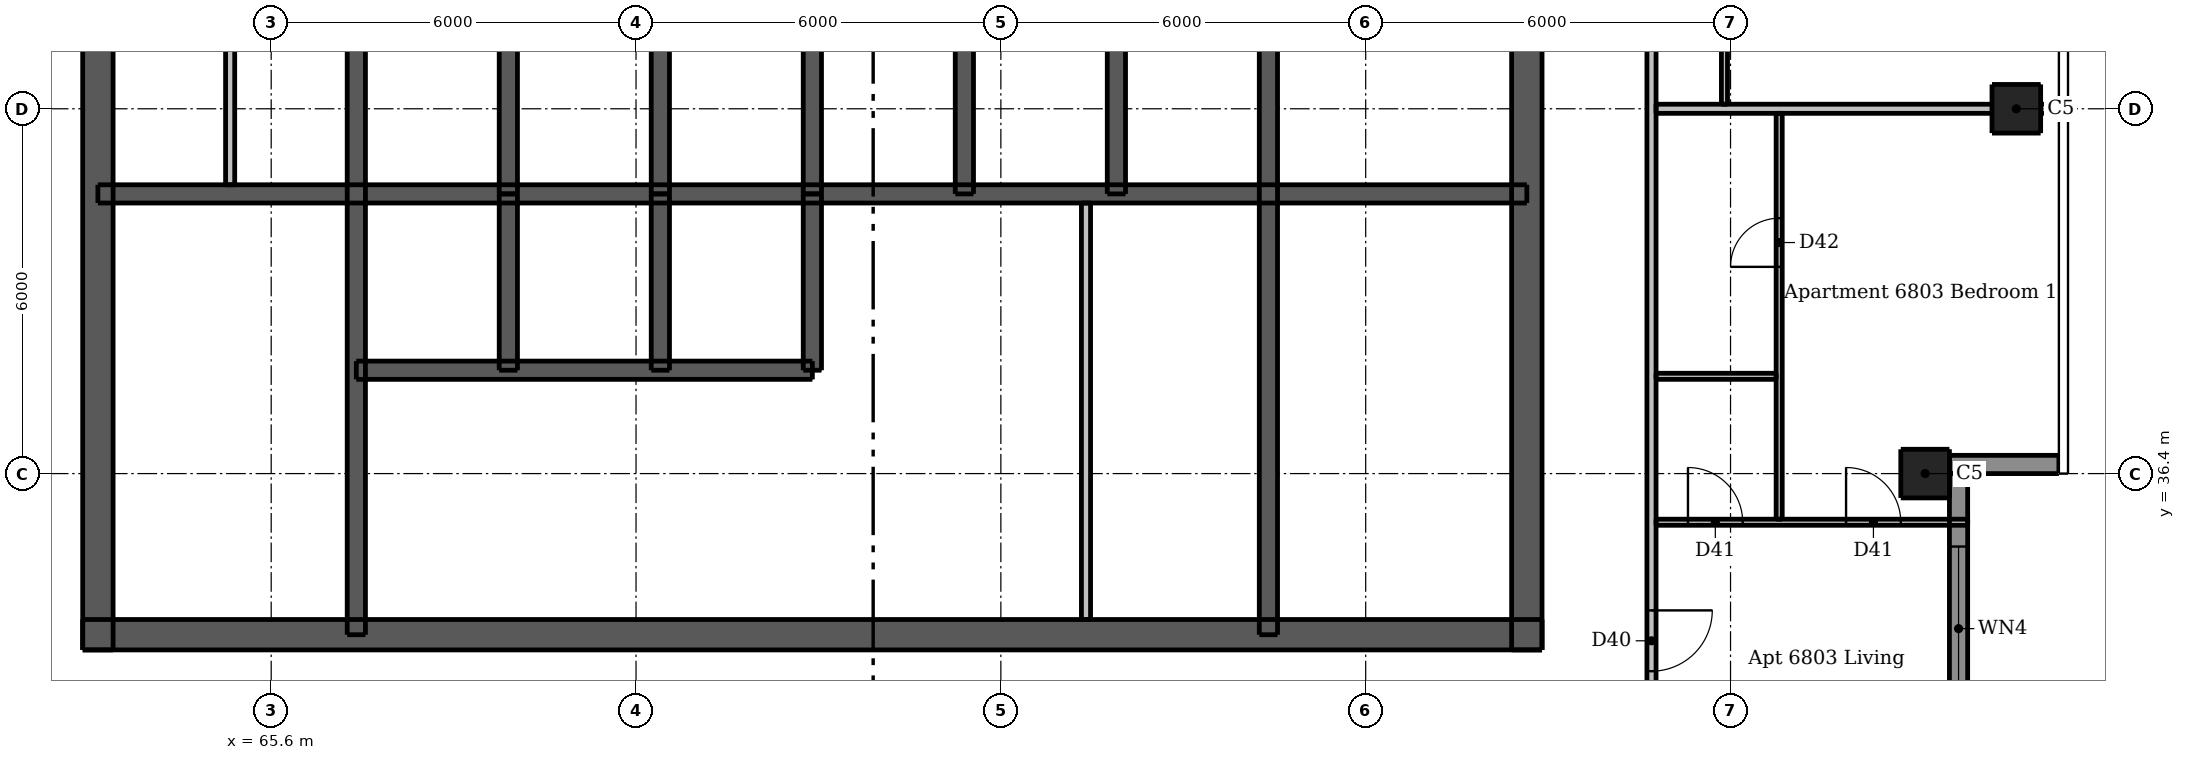
"""IFC4 building model, lengths in metres.
Left out: names, types, materials, properties, quantities, classifications, styles, units other than length and angle.
Written with IfcOpenShell. Run it as: python <this file> out.ifc"""

import sys

from ifc_helpers import new_model, si_unit, direction, frame, frame_2d, origin, origin_2d, place, context, subcontext, project, spatial, rectangle, extrude, element, fill, save


model = new_model("IFC4")
c1 = context("Model", 3, precision=1e-05, world=origin(), true_north=direction((0.0, 1.0)))
c2 = subcontext(c1, "Body", "Model", "MODEL_VIEW")
j1 = project(units=[si_unit("LENGTHUNIT", "METRE"), si_unit("PLANEANGLEUNIT", "RADIAN")], contexts=[c1])
p1 = place(None, origin())
s1 = spatial("IfcSite", under=j1, at=p1, CompositionType="ELEMENT")
p2 = place(p1, origin())
s2 = spatial("IfcBuilding", under=s1, at=p2, CompositionType="ELEMENT")
p3 = place(p2, frame((0.0, 0.0, 255.4)))
s3 = spatial("IfcBuildingStorey", under=s2, at=p3, CompositionType="ELEMENT", Elevation=255.4)
p4 = place(p3, frame((62.5, 33.75, 0.0), z_axis=(0.0, 0.0, 1.0), x_axis=(1.0, 0.0, 0.0)))
e1 = element("IfcWall", 1, at=p4, inside=s3, PredefinedType="SHEAR", context=c2, shape_type="SweptSolid", body=[
    extrude(rectangle(XDim=24.0, YDim=0.5, at=frame_2d((12.0, 0.0))), origin(), (0.0, 0.0, 1.0), 3.05),
])
p5 = place(p4, frame((1.875, 0.0, 0.0)))
e2 = element("IfcOpeningElement", 2, at=p5, cuts=e1, PredefinedType="OPENING", context=c2, shape_type="SweptSolid", body=[
    extrude(rectangle(XDim=1.1, YDim=2.1, at=frame_2d((0.55, 1.05))), frame((0.0, 0.26, 0.0), z_axis=(0.0, -1.0, 0.0), x_axis=(1.0, 0.0, 0.0)), (0.0, 0.0, 1.0), 0.52),
])
p6 = place(p4, frame((21.025, 0.0, 0.0)))
e3 = element("IfcOpeningElement", 3, at=p6, cuts=e1, PredefinedType="OPENING", context=c2, shape_type="SweptSolid", body=[
    extrude(rectangle(XDim=1.1, YDim=2.1, at=frame_2d((0.55, 1.05))), frame((0.0, 0.26, 0.0), z_axis=(0.0, -1.0, 0.0), x_axis=(1.0, 0.0, 0.0)), (0.0, 0.0, 1.0), 0.52),
])
p7 = place(p4, frame((8.0, 0.0, 0.0)))
e4 = element("IfcOpeningElement", 4, at=p7, cuts=e1, PredefinedType="OPENING", context=c2, shape_type="SweptSolid", body=[
    extrude(rectangle(XDim=1.1, YDim=2.1, at=frame_2d((0.55, 1.05))), frame((0.0, 0.26, 0.0), z_axis=(0.0, -1.0, 0.0), x_axis=(1.0, 0.0, 0.0)), (0.0, 0.0, 1.0), 0.52),
])
p8 = place(p4, frame((17.512, 0.0, 0.0)))
e5 = element("IfcOpeningElement", 5, at=p8, cuts=e1, PredefinedType="OPENING", context=c2, shape_type="SweptSolid", body=[
    extrude(rectangle(XDim=0.9, YDim=2.1, at=frame_2d((0.45, 1.05))), frame((0.0, 0.26, 0.0), z_axis=(0.0, -1.0, 0.0), x_axis=(1.0, 0.0, 0.0)), (0.0, 0.0, 1.0), 0.52),
])
p9 = place(p3, frame((62.75, 33.5, 0.0), z_axis=(0.0, 0.0, 1.0), x_axis=(0.0, 1.0, 0.0)))
e6 = element("IfcWall", 6, at=p9, inside=s3, PredefinedType="SHEAR", context=c2, shape_type="SweptSolid", body=[
    extrude(rectangle(XDim=24.0, YDim=0.5, at=frame_2d((12.0, 0.0))), origin(), (0.0, 0.0, 1.0), 3.05),
])
p10 = place(p9, frame((11.2, 0.0, 0.0)))
e7 = element("IfcOpeningElement", 7, at=p10, cuts=e6, PredefinedType="OPENING", context=c2, shape_type="SweptSolid", body=[
    extrude(rectangle(XDim=1.6, YDim=2.1, at=frame_2d((0.8, 1.05))), frame((0.0, 0.26, 0.0), z_axis=(0.0, -1.0, 0.0), x_axis=(1.0, 0.0, 0.0)), (0.0, 0.0, 1.0), 0.52),
])
p11 = place(p3, frame((86.25, 33.5, 0.0), z_axis=(0.0, 0.0, 1.0), x_axis=(0.0, 1.0, 0.0)))
e8 = element("IfcWall", 8, at=p11, inside=s3, PredefinedType="SHEAR", context=c2, shape_type="SweptSolid", body=[
    extrude(rectangle(XDim=24.0, YDim=0.5, at=frame_2d((12.0, 0.0))), origin(), (0.0, 0.0, 1.0), 3.05),
])
p12 = place(p11, frame((11.2, 0.0, 0.0)))
e9 = element("IfcOpeningElement", 9, at=p12, cuts=e8, PredefinedType="OPENING", context=c2, shape_type="SweptSolid", body=[
    extrude(rectangle(XDim=1.6, YDim=2.1, at=frame_2d((0.8, 1.05))), frame((0.0, 0.26, 0.0), z_axis=(0.0, -1.0, 0.0), x_axis=(1.0, 0.0, 0.0)), (0.0, 0.0, 1.0), 0.52),
])
p13 = place(p3, frame((62.75, 41.0, 0.0), z_axis=(0.0, 0.0, 1.0), x_axis=(1.0, 0.0, 0.0)))
e10 = element("IfcWall", 10, at=p13, inside=s3, PredefinedType="SHEAR", context=c2, shape_type="SweptSolid", body=[
    extrude(rectangle(XDim=23.5, YDim=0.3, at=frame_2d((11.75, 0.0))), origin(), (0.0, 0.0, 1.0), 3.05),
])
p14 = place(p3, frame((67.0, 33.75, 0.0), z_axis=(0.0, 0.0, 1.0), x_axis=(0.0, 1.0, 0.0)))
e11 = element("IfcWall", 11, at=p14, inside=s3, PredefinedType="SHEAR", context=c2, shape_type="SweptSolid", body=[
    extrude(rectangle(XDim=10.15, YDim=0.3, at=frame_2d((5.075, 0.0))), origin(), (0.0, 0.0, 1.0), 3.05),
])
p15 = place(p14, frame((0.45, 0.0, 0.0)))
e12 = element("IfcOpeningElement", 12, at=p15, cuts=e11, PredefinedType="OPENING", context=c2, shape_type="SweptSolid", body=[
    extrude(rectangle(XDim=1.1, YDim=2.1, at=frame_2d((0.55, 1.05))), frame((0.0, 0.16, 0.0), z_axis=(0.0, -1.0, 0.0), x_axis=(1.0, 0.0, 0.0)), (0.0, 0.0, 1.0), 0.32),
])
p16 = place(p3, frame((82.0, 33.75, 0.0), z_axis=(0.0, 0.0, 1.0), x_axis=(0.0, 1.0, 0.0)))
e13 = element("IfcWall", 13, at=p16, inside=s3, PredefinedType="SHEAR", context=c2, shape_type="SweptSolid", body=[
    extrude(rectangle(XDim=10.15, YDim=0.3, at=frame_2d((5.075, 0.0))), origin(), (0.0, 0.0, 1.0), 3.05),
])
for number, where, z_axis, x_axis in (
    (14, (69.5, 41.0, 0.0), (0.0, 0.0, 1.0), (0.0, 1.0, 0.0)),
    (15, (72.0, 41.0, 0.0), (0.0, 0.0, 1.0), (0.0, 1.0, 0.0)),
    (16, (74.5, 41.0, 0.0), (0.0, 0.0, 1.0), (0.0, 1.0, 0.0)),
    (17, (77.0, 41.0, 0.0), (0.0, 0.0, 1.0), (0.0, 1.0, 0.0)),
    (18, (79.5, 41.0, 0.0), (0.0, 0.0, 1.0), (0.0, 1.0, 0.0)),
):
    element("IfcWall", number, at=place(p3, frame(where, z_axis=z_axis, x_axis=x_axis)), inside=s3, PredefinedType="SHEAR", context=c2, shape_type="SweptSolid", body=[
        extrude(rectangle(XDim=2.9, YDim=0.3, at=frame_2d((1.45, 0.0))), origin(), (0.0, 0.0, 1.0), 3.05),
    ])
p17 = place(p3, frame((67.0, 38.1, 0.0), z_axis=(0.0, 0.0, 1.0), x_axis=(1.0, 0.0, 0.0)))
e19 = element("IfcWall", 19, at=p17, inside=s3, PredefinedType="SHEAR", context=c2, shape_type="SweptSolid", body=[
    extrude(rectangle(XDim=7.5, YDim=0.3, at=frame_2d((3.75, 0.0))), origin(), (0.0, 0.0, 1.0), 3.05),
])
p18 = place(p17, frame((0.7, 0.0, 0.0)))
e20 = element("IfcOpeningElement", 20, at=p18, cuts=e19, PredefinedType="OPENING", context=c2, shape_type="SweptSolid", body=[
    extrude(rectangle(XDim=1.1, YDim=2.1, at=frame_2d((0.55, 1.05))), frame((0.0, 0.16, 0.0), z_axis=(0.0, -1.0, 0.0), x_axis=(1.0, 0.0, 0.0)), (0.0, 0.0, 1.0), 0.32),
])
p19 = place(p17, frame((3.2, 0.0, 0.0)))
e21 = element("IfcOpeningElement", 21, at=p19, cuts=e19, PredefinedType="OPENING", context=c2, shape_type="SweptSolid", body=[
    extrude(rectangle(XDim=1.1, YDim=2.1, at=frame_2d((0.55, 1.05))), frame((0.0, 0.16, 0.0), z_axis=(0.0, -1.0, 0.0), x_axis=(1.0, 0.0, 0.0)), (0.0, 0.0, 1.0), 0.32),
])
p20 = place(p17, frame((5.65, 0.0, 0.0)))
e22 = element("IfcOpeningElement", 22, at=p20, cuts=e19, PredefinedType="OPENING", context=c2, shape_type="SweptSolid", body=[
    extrude(rectangle(XDim=1.2, YDim=2.1, at=frame_2d((0.6, 1.05))), frame((0.0, 0.16, 0.0), z_axis=(0.0, -1.0, 0.0), x_axis=(1.0, 0.0, 0.0)), (0.0, 0.0, 1.0), 0.32),
])
for number, where, z_axis, x_axis in (
    (23, (69.5, 38.1, 0.0), (0.0, 0.0, 1.0), (0.0, 1.0, 0.0)),
    (24, (72.0, 38.1, 0.0), (0.0, 0.0, 1.0), (0.0, 1.0, 0.0)),
    (25, (74.5, 38.1, 0.0), (0.0, 0.0, 1.0), (0.0, 1.0, 0.0)),
):
    element("IfcWall", number, at=place(p3, frame(where, z_axis=z_axis, x_axis=x_axis)), inside=s3, PredefinedType="SHEAR", context=c2, shape_type="SweptSolid", body=[
        extrude(rectangle(XDim=2.9, YDim=0.3, at=frame_2d((1.45, 0.0))), origin(), (0.0, 0.0, 1.0), 3.05),
    ])
for number, where, z_axis, x_axis in (
    (26, (92.8, 36.4, 0.0), (0.0, 0.0, 1.0), (1.0, 0.0, 0.0)),
    (27, (94.3, 42.4, 0.0), (0.0, 0.0, 1.0), (1.0, 0.0, 0.0)),
):
    element("IfcColumn", number, at=place(p3, frame(where, z_axis=z_axis, x_axis=x_axis)), inside=s3, PredefinedType="COLUMN", context=c2, shape_type="SweptSolid", body=[
        extrude(rectangle(XDim=0.8, YDim=0.8, at=origin_2d()), origin(), (0.0, 0.0, 1.0), 3.05),
    ])
p21 = place(p3, frame((93.2, 36.55, 0.0), z_axis=(0.0, 0.0, 1.0), x_axis=(1.0, 0.0, 0.0)))
e28 = element("IfcWall", 28, at=p21, inside=s3, PredefinedType="SOLIDWALL", context=c2, shape_type="SweptSolid", body=[
    extrude(rectangle(XDim=1.8, YDim=0.3, at=frame_2d((0.9, 0.0))), origin(), (0.0, 0.0, 1.0), 3.05),
])
p22 = place(p3, frame((93.35, 31.3, 0.0), z_axis=(0.0, 0.0, 1.0), x_axis=(0.0, 1.0, 0.0)))
e29 = element("IfcWall", 29, at=p22, inside=s3, PredefinedType="SOLIDWALL", context=c2, shape_type="SweptSolid", body=[
    extrude(rectangle(XDim=5.1, YDim=0.3, at=frame_2d((2.55, 0.0))), origin(), (0.0, 0.0, 1.0), 3.05),
])
p23 = place(p22, frame((1.2, 0.0, 0.15)))
e30 = element("IfcOpeningElement", 30, at=p23, cuts=e29, PredefinedType="OPENING", context=c2, shape_type="SweptSolid", body=[
    extrude(rectangle(XDim=2.7, YDim=2.1, at=frame_2d((1.35, 1.05))), frame((0.0, 0.16, 0.0), z_axis=(0.0, -1.0, 0.0), x_axis=(1.0, 0.0, 0.0)), (0.0, 0.0, 1.0), 0.32),
])
p24 = place(p3, frame((79.0, 34.0, 0.0), z_axis=(0.0, 0.0, 1.0), x_axis=(0.0, 1.0, 0.0)))
e31 = element("IfcWall", 31, at=p24, inside=s3, PredefinedType="PLUMBINGWALL", context=c2, shape_type="SweptSolid", body=[
    extrude(rectangle(XDim=6.85, YDim=0.15, at=frame_2d((3.425, 0.0))), origin(), (0.0, 0.0, 1.0), 3.05),
])
p25 = place(p3, frame((64.925, 41.15, 0.0), z_axis=(0.0, 0.0, 1.0), x_axis=(0.0, 1.0, 0.0)))
e32 = element("IfcWall", 32, at=p25, inside=s3, PredefinedType="PLUMBINGWALL", context=c2, shape_type="SweptSolid", body=[
    extrude(rectangle(XDim=2.6, YDim=0.15, at=frame_2d((1.3, 0.0))), origin(), (0.0, 0.0, 1.0), 3.05),
])
p26 = place(p3, frame((89.5, 60.325, 0.0), z_axis=(0.0, 0.0, 1.0), x_axis=(0.0, -1.0, 0.0)))
e33 = element("IfcWall", 33, at=p26, inside=s3, PredefinedType="PARTITIONING", context=c2, shape_type="SweptSolid", body=[
    extrude(rectangle(XDim=17.85, YDim=0.1, at=frame_2d((8.925, 0.0))), origin(), (0.0, 0.0, 1.0), 3.05),
])
p27 = place(p26, frame((6.975, 0.0, 0.0)))
e34 = element("IfcOpeningElement", 34, at=p27, cuts=e33, PredefinedType="OPENING", context=c2, shape_type="SweptSolid", body=[
    extrude(rectangle(XDim=0.9, YDim=2.1, at=frame_2d((0.45, 1.05))), frame((0.0, 0.06, 0.0), z_axis=(0.0, -1.0, 0.0), x_axis=(1.0, 0.0, 0.0)), (0.0, 0.0, 1.0), 0.12),
])
p28 = place(p26, frame((0.975, 0.0, 0.0)))
e35 = element("IfcOpeningElement", 35, at=p28, cuts=e33, PredefinedType="OPENING", context=c2, shape_type="SweptSolid", body=[
    extrude(rectangle(XDim=0.9, YDim=2.1, at=frame_2d((0.45, 1.05))), frame((0.0, 0.06, 0.0), z_axis=(0.0, -1.0, 0.0), x_axis=(1.0, 0.0, 0.0)), (0.0, 0.0, 1.0), 0.12),
])
p29 = place(p26, frame((15.675, 0.0, 0.0)))
e36 = element("IfcOpeningElement", 36, at=p29, cuts=e33, PredefinedType="OPENING", context=c2, shape_type="SweptSolid", body=[
    extrude(rectangle(XDim=0.9, YDim=2.1, at=frame_2d((0.45, 1.05))), frame((0.0, 0.06, 0.0), z_axis=(0.0, -1.0, 0.0), x_axis=(1.0, 0.0, 0.0)), (0.0, 0.0, 1.0), 0.12),
])
p30 = place(p26, frame((12.725, 0.0, 0.0)))
e37 = element("IfcOpeningElement", 37, at=p30, cuts=e33, PredefinedType="OPENING", context=c2, shape_type="SweptSolid", body=[
    extrude(rectangle(XDim=0.8, YDim=2.1, at=frame_2d((0.4, 1.05))), frame((0.0, 0.06, 0.0), z_axis=(0.0, -1.0, 0.0), x_axis=(1.0, 0.0, 0.0)), (0.0, 0.0, 1.0), 0.12),
])
p31 = place(p3, frame((90.4, 35.65, 0.0), z_axis=(0.0, 0.0, 1.0), x_axis=(0.0, 1.0, 0.0)))
e38 = element("IfcWall", 38, at=p31, inside=s3, PredefinedType="PARTITIONING", context=c2, shape_type="SweptSolid", body=[
    extrude(rectangle(XDim=6.675, YDim=0.1, at=frame_2d((3.337, 0.0))), origin(), (0.0, 0.0, 1.0), 3.05),
])
p32 = place(p31, frame((4.15, 0.0, 0.0)))
e39 = element("IfcOpeningElement", 39, at=p32, cuts=e38, PredefinedType="OPENING", context=c2, shape_type="SweptSolid", body=[
    extrude(rectangle(XDim=0.8, YDim=2.1, at=frame_2d((0.4, 1.05))), frame((0.0, 0.06, 0.0), z_axis=(0.0, -1.0, 0.0), x_axis=(1.0, 0.0, 0.0)), (0.0, 0.0, 1.0), 0.12),
])
p33 = place(p3, frame((88.375, 38.0, 0.0), z_axis=(0.0, 0.0, 1.0), x_axis=(1.0, 0.0, 0.0)))
e40 = element("IfcWall", 40, at=p33, inside=s3, PredefinedType="PARTITIONING", context=c2, shape_type="SweptSolid", body=[
    extrude(rectangle(XDim=1.975, YDim=0.1, at=frame_2d((0.988, 0.0))), origin(), (0.0, 0.0, 1.0), 3.05),
])
p34 = place(p3, frame((88.375, 35.6, 0.0), z_axis=(0.0, 0.0, 1.0), x_axis=(1.0, 0.0, 0.0)))
e41 = element("IfcWall", 41, at=p34, inside=s3, PredefinedType="PARTITIONING", context=c2, shape_type="SweptSolid", body=[
    extrude(rectangle(XDim=5.125, YDim=0.1, at=frame_2d((2.562, 0.0))), origin(), (0.0, 0.0, 1.0), 3.05),
])
p35 = place(p34, frame((0.525, 0.0, 0.0)))
e42 = element("IfcOpeningElement", 42, at=p35, cuts=e41, PredefinedType="OPENING", context=c2, shape_type="SweptSolid", body=[
    extrude(rectangle(XDim=0.9, YDim=2.1, at=frame_2d((0.45, 1.05))), frame((0.0, 0.06, 0.0), z_axis=(0.0, -1.0, 0.0), x_axis=(1.0, 0.0, 0.0)), (0.0, 0.0, 1.0), 0.12),
])
p36 = place(p34, frame((3.125, 0.0, 0.0)))
e43 = element("IfcOpeningElement", 43, at=p36, cuts=e41, PredefinedType="OPENING", context=c2, shape_type="SweptSolid", body=[
    extrude(rectangle(XDim=0.9, YDim=2.1, at=frame_2d((0.45, 1.05))), frame((0.0, 0.06, 0.0), z_axis=(0.0, -1.0, 0.0), x_axis=(1.0, 0.0, 0.0)), (0.0, 0.0, 1.0), 0.12),
])
p37 = place(p3, frame((88.3, 61.175, 0.0), z_axis=(0.0, 0.0, 1.0), x_axis=(0.0, -1.0, 0.0)))
e44 = element("IfcWall", 44, at=p37, inside=s3, PredefinedType="PARTITIONING", context=c2, shape_type="SweptSolid", body=[
    extrude(rectangle(XDim=29.4, YDim=0.15, at=frame_2d((14.7, 0.0))), origin(), (0.0, 0.0, 1.0), 3.05),
])
p38 = place(p37, frame((27.025, 0.0, 0.0)))
e45 = element("IfcOpeningElement", 45, at=p38, cuts=e44, PredefinedType="OPENING", context=c2, shape_type="SweptSolid", body=[
    extrude(rectangle(XDim=1.0, YDim=2.1, at=frame_2d((0.5, 1.05))), frame((0.0, 0.085, 0.0), z_axis=(0.0, -1.0, 0.0), x_axis=(1.0, 0.0, 0.0)), (0.0, 0.0, 1.0), 0.17),
])
p39 = place(p37, frame((9.275, 0.0, 0.0)))
e46 = element("IfcOpeningElement", 46, at=p39, cuts=e44, PredefinedType="OPENING", context=c2, shape_type="SweptSolid", body=[
    extrude(rectangle(XDim=1.0, YDim=2.1, at=frame_2d((0.5, 1.05))), frame((0.0, 0.085, 0.0), z_axis=(0.0, -1.0, 0.0), x_axis=(1.0, 0.0, 0.0)), (0.0, 0.0, 1.0), 0.17),
])
p40 = place(p3, frame((88.375, 42.4, 0.0), z_axis=(0.0, 0.0, 1.0), x_axis=(1.0, 0.0, 0.0)))
e47 = element("IfcWall", 47, at=p40, inside=s3, PredefinedType="PARTITIONING", context=c2, shape_type="SweptSolid", body=[
    extrude(rectangle(XDim=6.625, YDim=0.15, at=frame_2d((3.312, 0.0))), origin(), (0.0, 0.0, 1.0), 2.59),
])
p41 = place(p23, origin())
e48 = element("IfcWindow", 48, at=p41, inside=s3, PartitioningType="DOUBLE_PANEL_VERTICAL", PredefinedType="WINDOW", context=c2, shape_type="SweptSolid", body=[
    extrude(rectangle(XDim=2.7, YDim=2.1, at=frame_2d((1.35, 1.05))), frame((0.0, 0.03, 0.0), z_axis=(0.0, -1.0, 0.0), x_axis=(1.0, 0.0, 0.0)), (0.0, 0.0, 1.0), 0.06),
])
fill(e30, e48)
p42 = place(p5, origin())
e49 = element("IfcDoor", 49, at=p42, inside=s3, OperationType="SINGLE_SWING_LEFT", PredefinedType="DOOR", context=c2, shape_type="SweptSolid", body=[
    extrude(rectangle(XDim=1.1, YDim=2.1, at=frame_2d((0.55, 1.05))), frame((0.0, 0.237, 0.0), z_axis=(0.0, -1.0, 0.0), x_axis=(1.0, 0.0, 0.0)), (0.0, 0.0, 1.0), 0.05),
])
fill(e2, e49)
p43 = place(p6, origin())
e50 = element("IfcDoor", 50, at=p43, inside=s3, OperationType="SINGLE_SWING_RIGHT", PredefinedType="DOOR", context=c2, shape_type="SweptSolid", body=[
    extrude(rectangle(XDim=1.1, YDim=2.1, at=frame_2d((0.55, 1.05))), frame((0.0, 0.237, 0.0), z_axis=(0.0, -1.0, 0.0), x_axis=(1.0, 0.0, 0.0)), (0.0, 0.0, 1.0), 0.05),
])
fill(e3, e50)
p44 = place(p7, origin())
e51 = element("IfcDoor", 51, at=p44, inside=s3, OperationType="SINGLE_SWING_LEFT", PredefinedType="DOOR", context=c2, shape_type="SweptSolid", body=[
    extrude(rectangle(XDim=1.1, YDim=2.1, at=frame_2d((0.55, 1.05))), frame((0.0, 0.237, 0.0), z_axis=(0.0, -1.0, 0.0), x_axis=(1.0, 0.0, 0.0)), (0.0, 0.0, 1.0), 0.05),
])
fill(e4, e51)
p45 = place(p15, origin())
e52 = element("IfcDoor", 52, at=p45, inside=s3, OperationType="SINGLE_SWING_RIGHT", PredefinedType="DOOR", context=c2, shape_type="SweptSolid", body=[
    extrude(rectangle(XDim=1.1, YDim=2.1, at=frame_2d((0.55, 1.05))), frame((0.0, -0.087, 0.0), z_axis=(0.0, -1.0, 0.0), x_axis=(1.0, 0.0, 0.0)), (0.0, 0.0, 1.0), 0.05),
])
fill(e12, e52)
p46 = place(p8, origin())
e53 = element("IfcDoor", 53, at=p46, inside=s3, OperationType="SINGLE_SWING_LEFT", PredefinedType="DOOR", context=c2, shape_type="SweptSolid", body=[
    extrude(rectangle(XDim=0.9, YDim=2.1, at=frame_2d((0.45, 1.05))), frame((0.0, 0.237, 0.0), z_axis=(0.0, -1.0, 0.0), x_axis=(1.0, 0.0, 0.0)), (0.0, 0.0, 1.0), 0.05),
])
fill(e5, e53)
p47 = place(p18, origin())
e54 = element("IfcDoor", 54, at=p47, inside=s3, OperationType="DOUBLE_DOOR_SLIDING", PredefinedType="DOOR", context=c2, shape_type="SweptSolid", body=[
    extrude(rectangle(XDim=1.1, YDim=2.1, at=frame_2d((0.55, 1.05))), frame((0.0, 0.025, 0.0), z_axis=(0.0, -1.0, 0.0), x_axis=(1.0, 0.0, 0.0)), (0.0, 0.0, 1.0), 0.05),
])
fill(e20, e54)
p48 = place(p19, origin())
e55 = element("IfcDoor", 55, at=p48, inside=s3, OperationType="DOUBLE_DOOR_SLIDING", PredefinedType="DOOR", context=c2, shape_type="SweptSolid", body=[
    extrude(rectangle(XDim=1.1, YDim=2.1, at=frame_2d((0.55, 1.05))), frame((0.0, 0.025, 0.0), z_axis=(0.0, -1.0, 0.0), x_axis=(1.0, 0.0, 0.0)), (0.0, 0.0, 1.0), 0.05),
])
fill(e21, e55)
p49 = place(p20, origin())
e56 = element("IfcDoor", 56, at=p49, inside=s3, OperationType="DOUBLE_DOOR_SLIDING", PredefinedType="DOOR", context=c2, shape_type="SweptSolid", body=[
    extrude(rectangle(XDim=1.2, YDim=2.1, at=frame_2d((0.6, 1.05))), frame((0.0, 0.025, 0.0), z_axis=(0.0, -1.0, 0.0), x_axis=(1.0, 0.0, 0.0)), (0.0, 0.0, 1.0), 0.05),
])
fill(e22, e56)
p50 = place(p38, origin())
e57 = element("IfcDoor", 57, at=p50, inside=s3, OperationType="SINGLE_SWING_LEFT", PredefinedType="DOOR", context=c2, shape_type="SweptSolid", body=[
    extrude(rectangle(XDim=1.0, YDim=2.1, at=frame_2d((0.5, 1.05))), frame((0.0, 0.025, 0.0), z_axis=(0.0, -1.0, 0.0), x_axis=(1.0, 0.0, 0.0)), (0.0, 0.0, 1.0), 0.05),
])
fill(e45, e57)
p51 = place(p35, origin())
e58 = element("IfcDoor", 58, at=p51, inside=s3, OperationType="SINGLE_SWING_LEFT", PredefinedType="DOOR", context=c2, shape_type="SweptSolid", body=[
    extrude(rectangle(XDim=0.9, YDim=2.1, at=frame_2d((0.45, 1.05))), frame((0.0, 0.025, 0.0), z_axis=(0.0, -1.0, 0.0), x_axis=(1.0, 0.0, 0.0)), (0.0, 0.0, 1.0), 0.05),
])
fill(e42, e58)
p52 = place(p36, origin())
e59 = element("IfcDoor", 59, at=p52, inside=s3, OperationType="SINGLE_SWING_LEFT", PredefinedType="DOOR", context=c2, shape_type="SweptSolid", body=[
    extrude(rectangle(XDim=0.9, YDim=2.1, at=frame_2d((0.45, 1.05))), frame((0.0, 0.025, 0.0), z_axis=(0.0, -1.0, 0.0), x_axis=(1.0, 0.0, 0.0)), (0.0, 0.0, 1.0), 0.05),
])
fill(e43, e59)
p53 = place(p32, origin())
e60 = element("IfcDoor", 60, at=p53, inside=s3, OperationType="SINGLE_SWING_LEFT", PredefinedType="DOOR", context=c2, shape_type="SweptSolid", body=[
    extrude(rectangle(XDim=0.8, YDim=2.1, at=frame_2d((0.4, 1.05))), frame((0.0, 0.025, 0.0), z_axis=(0.0, -1.0, 0.0), x_axis=(1.0, 0.0, 0.0)), (0.0, 0.0, 1.0), 0.05),
])
fill(e39, e60)
save(model, sys.argv[1])
